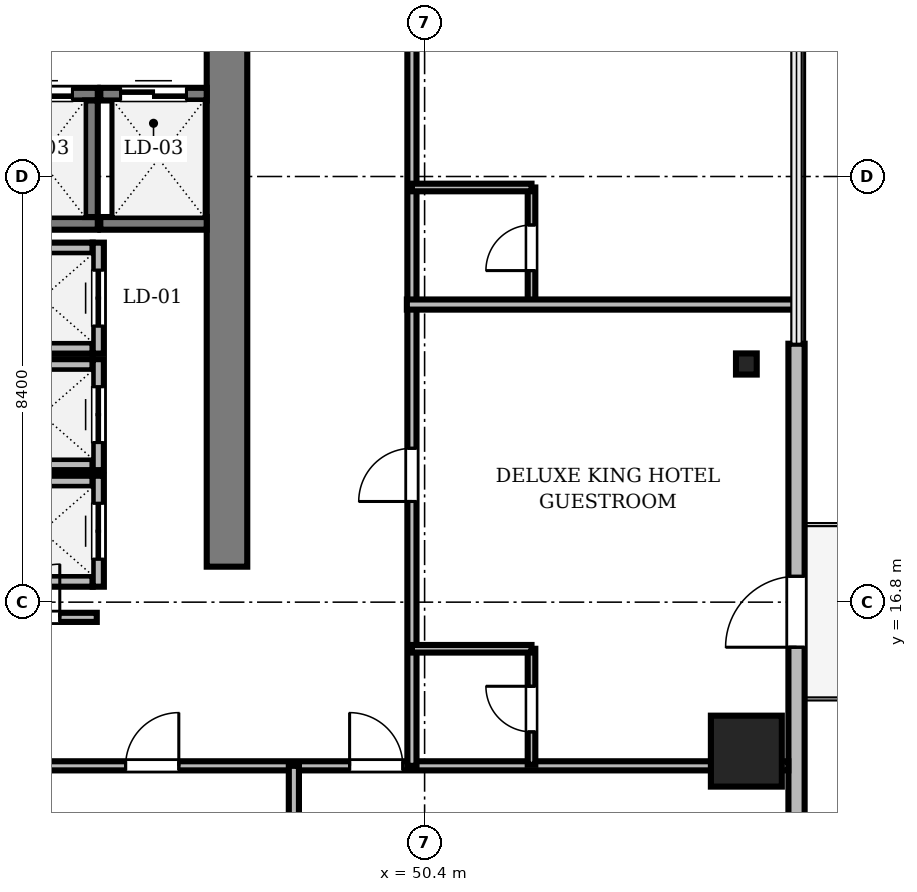
"""IFC4 building model, lengths in metres.
Left out: names, types, materials, properties, quantities, classifications, styles, units other than length and angle.
Written with IfcOpenShell. Run it as: python <this file> out.ifc"""

import sys

from ifc_helpers import new_model, si_unit, direction, frame, frame_2d, origin, origin_2d, place, context, subcontext, project, spatial, rectangle, i_section, extrude, source, transform, mapped, element, fill, save


model = new_model("IFC4")
c1 = context("Model", 3, precision=1e-05, world=origin(), true_north=direction((0.0, 1.0)))
c2 = subcontext(c1, "Body", "Model", "MODEL_VIEW")
j1 = project(units=[si_unit("LENGTHUNIT", "METRE"), si_unit("PLANEANGLEUNIT", "RADIAN")], contexts=[c1])
p1 = place(None, origin())
s1 = spatial("IfcSite", under=j1, at=p1, CompositionType="ELEMENT")
p2 = place(p1, origin())
s2 = spatial("IfcBuilding", under=s1, at=p2, CompositionType="ELEMENT")
p3 = place(p2, frame((0.0, 0.0, 218.55)))
s3 = spatial("IfcBuildingStorey", under=s2, at=p3, CompositionType="ELEMENT", Elevation=218.55)
m1 = source(origin(), c2, "Body", "SweptSolid", [
    extrude(rectangle(XDim=13.15, YDim=0.8, at=frame_2d((6.575, 0.0))), origin(), (0.0, 0.0, 1.0), 3.53),
])
p4 = place(p3, frame((46.5, 17.5, 0.0), z_axis=(0.0, 0.0, 1.0), x_axis=(0.0, 1.0, 0.0)))
e1 = element("IfcWall", 1, at=p4, inside=s3, PredefinedType="SHEAR", context=c2, shape_type="MappedRepresentation", body=[
    mapped(m1, transform((0.0, 0.0, 0.0), scale=1.0)),
])
m2 = source(origin(), c2, "Body", "SweptSolid", [
    extrude(rectangle(XDim=1.4, YDim=1.4, at=origin_2d()), origin(), (0.0, 0.0, 1.0), 3.53),
])
p5 = place(p3, frame((56.75, 13.86, 0.0), z_axis=(0.0, 0.0, 1.0), x_axis=(1.0, 0.0, 0.0)))
e2 = element("IfcColumn", 2, at=p5, inside=s3, PredefinedType="COLUMN", context=c2, shape_type="MappedRepresentation", body=[
    mapped(m2, transform((0.0, 0.0, 0.0), scale=1.0)),
])
m3 = source(origin(), c2, "Body", "SweptSolid", [
    extrude(i_section(OverallWidth=0.409, OverallDepth=0.417, WebThickness=0.021, FlangeThickness=0.033, FilletRadius=0.015, at=origin_2d()), origin(), (0.0, 0.0, 1.0), 3.53),
])
p6 = place(p3, frame((56.75, 21.5, 0.0), z_axis=(0.0, 0.0, 1.0), x_axis=(1.0, 0.0, 0.0)))
e3 = element("IfcColumn", 3, at=p6, inside=s3, PredefinedType="COLUMN", context=c2, shape_type="MappedRepresentation", body=[
    mapped(m3, transform((0.0, 0.0, 0.0), scale=1.0)),
])
m4 = source(origin(), c2, "Body", "SweptSolid", [
    extrude(rectangle(XDim=15.6, YDim=0.32, at=frame_2d((7.8, 0.0))), origin(), (0.0, 0.0, 1.0), 3.53),
])
p7 = place(p3, frame((57.74, 6.3, 0.0), z_axis=(0.0, 0.0, 1.0), x_axis=(0.0, 1.0, 0.0)))
e4 = element("IfcWall", 4, at=p7, inside=s3, PredefinedType="SOLIDWALL", context=c2, shape_type="MappedRepresentation", body=[
    mapped(m4, transform((0.0, 0.0, 0.0), scale=1.0)),
])
m5 = source(origin(), c2, "Body", "SweptSolid", [
    extrude(rectangle(XDim=1.4, YDim=2.3, at=frame_2d((0.7, 1.15))), frame((0.0, 0.17, 0.0), z_axis=(0.0, -1.0, 0.0), x_axis=(1.0, 0.0, 0.0)), (0.0, 0.0, 1.0), 0.34),
])
p8 = place(p7, frame((9.61, 0.0, 0.0)))
e5 = element("IfcOpeningElement", 5, at=p8, cuts=e4, PredefinedType="OPENING", context=c2, shape_type="MappedRepresentation", body=[
    mapped(m5, transform((0.0, 0.0, 0.0), scale=1.0)),
])
m6 = source(origin(), c2, "Body", "SweptSolid", [
    extrude(rectangle(XDim=2.8, YDim=2.4, at=frame_2d((1.4, 1.2))), frame((0.0, 0.17, 0.0), z_axis=(0.0, -1.0, 0.0), x_axis=(1.0, 0.0, 0.0)), (0.0, 0.0, 1.0), 0.34),
])
p9 = place(p7, frame((2.705, 0.0, 0.72)))
e6 = element("IfcOpeningElement", 6, at=p9, cuts=e4, PredefinedType="OPENING", context=c2, shape_type="MappedRepresentation", body=[
    mapped(m6, transform((0.0, 0.0, 0.0), scale=1.0)),
])
m7 = source(origin(), c2, "Body", "SweptSolid", [
    extrude(rectangle(XDim=2.0, YDim=0.22, at=frame_2d((1.0, 0.0))), origin(), (0.0, 0.0, 1.0), 3.53),
])
for number, where, z_axis, x_axis in (
    (7, (41.85, 21.815, 0.0), (0.0, 0.0, 1.0), (1.0, 0.0, 0.0)),
    (8, (41.85, 23.785, 0.0), (0.0, 0.0, 1.0), (1.0, 0.0, 0.0)),
):
    element("IfcWall", number, at=place(p3, frame(where, z_axis=z_axis, x_axis=x_axis)), inside=s3, PredefinedType="SOLIDWALL", context=c2, shape_type="MappedRepresentation", body=[
        mapped(m7, transform((0.0, 0.0, 0.0), scale=1.0)),
    ])
m8 = source(origin(), c2, "Body", "SweptSolid", [
    extrude(rectangle(XDim=2.19, YDim=0.22, at=frame_2d((1.095, 0.0))), origin(), (0.0, 0.0, 1.0), 3.53),
])
p10 = place(p3, frame((43.96, 21.705, 0.0), z_axis=(0.0, 0.0, 1.0), x_axis=(0.0, 1.0, 0.0)))
e9 = element("IfcWall", 9, at=p10, inside=s3, PredefinedType="SOLIDWALL", context=c2, shape_type="MappedRepresentation", body=[
    mapped(m8, transform((0.0, 0.0, 0.0), scale=1.0)),
])
m9 = source(origin(), c2, "Body", "SweptSolid", [
    extrude(rectangle(XDim=1.1, YDim=2.2, at=frame_2d((0.55, 1.1))), frame((0.0, 0.12, 0.0), z_axis=(0.0, -1.0, 0.0), x_axis=(1.0, 0.0, 0.0)), (0.0, 0.0, 1.0), 0.24),
])
p11 = place(p10, frame((0.545, 0.0, 0.0)))
e10 = element("IfcOpeningElement", 10, at=p11, cuts=e9, PredefinedType="OPENING", context=c2, shape_type="MappedRepresentation", body=[
    mapped(m9, transform((0.0, 0.0, 0.0), scale=1.0)),
])
for number, where, z_axis, x_axis in (
    (11, (41.85, 19.515, 0.0), (0.0, 0.0, 1.0), (1.0, 0.0, 0.0)),
    (12, (41.85, 21.485, 0.0), (0.0, 0.0, 1.0), (1.0, 0.0, 0.0)),
):
    element("IfcWall", number, at=place(p3, frame(where, z_axis=z_axis, x_axis=x_axis)), inside=s3, PredefinedType="SOLIDWALL", context=c2, shape_type="MappedRepresentation", body=[
        mapped(m7, transform((0.0, 0.0, 0.0), scale=1.0)),
    ])
p12 = place(p3, frame((43.96, 19.405, 0.0), z_axis=(0.0, 0.0, 1.0), x_axis=(0.0, 1.0, 0.0)))
e13 = element("IfcWall", 13, at=p12, inside=s3, PredefinedType="SOLIDWALL", context=c2, shape_type="MappedRepresentation", body=[
    mapped(m8, transform((0.0, 0.0, 0.0), scale=1.0)),
])
p13 = place(p12, frame((0.545, 0.0, 0.0)))
e14 = element("IfcOpeningElement", 14, at=p13, cuts=e13, PredefinedType="OPENING", context=c2, shape_type="MappedRepresentation", body=[
    mapped(m9, transform((0.0, 0.0, 0.0), scale=1.0)),
])
for number, where, z_axis, x_axis in (
    (15, (41.85, 17.215, 0.0), (0.0, 0.0, 1.0), (1.0, 0.0, 0.0)),
    (16, (41.85, 19.185, 0.0), (0.0, 0.0, 1.0), (1.0, 0.0, 0.0)),
):
    element("IfcWall", number, at=place(p3, frame(where, z_axis=z_axis, x_axis=x_axis)), inside=s3, PredefinedType="SOLIDWALL", context=c2, shape_type="MappedRepresentation", body=[
        mapped(m7, transform((0.0, 0.0, 0.0), scale=1.0)),
    ])
p14 = place(p3, frame((43.96, 17.105, 0.0), z_axis=(0.0, 0.0, 1.0), x_axis=(0.0, 1.0, 0.0)))
e17 = element("IfcWall", 17, at=p14, inside=s3, PredefinedType="SOLIDWALL", context=c2, shape_type="MappedRepresentation", body=[
    mapped(m8, transform((0.0, 0.0, 0.0), scale=1.0)),
])
p15 = place(p14, frame((0.545, 0.0, 0.0)))
e18 = element("IfcOpeningElement", 18, at=p15, cuts=e17, PredefinedType="OPENING", context=c2, shape_type="MappedRepresentation", body=[
    mapped(m9, transform((0.0, 0.0, 0.0), scale=1.0)),
])
m10 = source(origin(), c2, "Body", "SweptSolid", [
    extrude(rectangle(XDim=2.3, YDim=0.25, at=frame_2d((1.15, 0.0))), origin(), (0.0, 0.0, 1.0), 3.53),
])
p16 = place(p3, frame((41.65, 24.275, 0.0), z_axis=(0.0, 0.0, 1.0), x_axis=(1.0, 0.0, 0.0)))
e19 = element("IfcWall", 19, at=p16, inside=s3, PredefinedType="SOLIDWALL", context=c2, shape_type="MappedRepresentation", body=[
    mapped(m10, transform((0.0, 0.0, 0.0), scale=1.0)),
])
p17 = place(p3, frame((41.65, 26.825, 0.0), z_axis=(0.0, 0.0, 1.0), x_axis=(1.0, 0.0, 0.0)))
e20 = element("IfcWall", 20, at=p17, inside=s3, PredefinedType="SOLIDWALL", context=c2, shape_type="MappedRepresentation", body=[
    mapped(m10, transform((0.0, 0.0, 0.0), scale=1.0)),
])
m11 = source(origin(), c2, "Body", "SweptSolid", [
    extrude(rectangle(XDim=1.3, YDim=2.3, at=frame_2d((0.65, 1.15))), frame((0.0, 0.135, 0.0), z_axis=(0.0, -1.0, 0.0), x_axis=(1.0, 0.0, 0.0)), (0.0, 0.0, 1.0), 0.27),
])
p18 = place(p17, frame((0.5, 0.0, 0.0)))
e21 = element("IfcOpeningElement", 21, at=p18, cuts=e20, PredefinedType="OPENING", context=c2, shape_type="MappedRepresentation", body=[
    mapped(m11, transform((0.0, 0.0, 0.0), scale=1.0)),
])
p19 = place(p3, frame((43.825, 24.4, 0.0), z_axis=(0.0, 0.0, 1.0), x_axis=(0.0, 1.0, 0.0)))
e22 = element("IfcWall", 22, at=p19, inside=s3, PredefinedType="SOLIDWALL", context=c2, shape_type="MappedRepresentation", body=[
    mapped(m10, transform((0.0, 0.0, 0.0), scale=1.0)),
])
m12 = source(origin(), c2, "Body", "SweptSolid", [
    extrude(rectangle(XDim=2.1, YDim=0.25, at=frame_2d((1.05, 0.0))), origin(), (0.0, 0.0, 1.0), 3.53),
])
p20 = place(p3, frame((44.0, 24.275, 0.0), z_axis=(0.0, 0.0, 1.0), x_axis=(1.0, 0.0, 0.0)))
e23 = element("IfcWall", 23, at=p20, inside=s3, PredefinedType="SOLIDWALL", context=c2, shape_type="MappedRepresentation", body=[
    mapped(m12, transform((0.0, 0.0, 0.0), scale=1.0)),
])
p21 = place(p3, frame((44.0, 26.825, 0.0), z_axis=(0.0, 0.0, 1.0), x_axis=(1.0, 0.0, 0.0)))
e24 = element("IfcWall", 24, at=p21, inside=s3, PredefinedType="SOLIDWALL", context=c2, shape_type="MappedRepresentation", body=[
    mapped(m12, transform((0.0, 0.0, 0.0), scale=1.0)),
])
p22 = place(p21, frame((0.4, 0.0, 0.0)))
e25 = element("IfcOpeningElement", 25, at=p22, cuts=e24, PredefinedType="OPENING", context=c2, shape_type="MappedRepresentation", body=[
    mapped(m11, transform((0.0, 0.0, 0.0), scale=1.0)),
])
m13 = source(origin(), c2, "Body", "SweptSolid", [
    extrude(rectangle(XDim=46.156, YDim=0.18, at=frame_2d((23.078, 0.0))), origin(), (0.0, 0.0, 1.0), 2.772),
])
p23 = place(p3, frame((11.422, 13.57, 0.0), z_axis=(0.0, 0.0, 1.0), x_axis=(1.0, 0.0, 0.0)))
e26 = element("IfcWall", 26, at=p23, inside=s3, PredefinedType="PARTITIONING", context=c2, shape_type="MappedRepresentation", body=[
    mapped(m13, transform((0.0, 0.0, 0.0), scale=1.0)),
])
m14 = source(origin(), c2, "Body", "SweptSolid", [
    extrude(rectangle(XDim=1.05, YDim=2.2, at=frame_2d((0.525, 1.1))), frame((0.0, 0.1, 0.0), z_axis=(0.0, -1.0, 0.0), x_axis=(1.0, 0.0, 0.0)), (0.0, 0.0, 1.0), 0.2),
])
p24 = place(p23, frame((10.438, 0.0, 0.0)))
e27 = element("IfcOpeningElement", 27, at=p24, cuts=e26, PredefinedType="OPENING", context=c2, shape_type="MappedRepresentation", body=[
    mapped(m14, transform((0.0, 0.0, 0.0), scale=1.0)),
])
p25 = place(p23, frame((13.218, 0.0, 0.0)))
e28 = element("IfcOpeningElement", 28, at=p25, cuts=e26, PredefinedType="OPENING", context=c2, shape_type="MappedRepresentation", body=[
    mapped(m14, transform((0.0, 0.0, 0.0), scale=1.0)),
])
p26 = place(p23, frame((16.893, 0.0, 0.0)))
e29 = element("IfcOpeningElement", 29, at=p26, cuts=e26, PredefinedType="OPENING", context=c2, shape_type="MappedRepresentation", body=[
    mapped(m14, transform((0.0, 0.0, 0.0), scale=1.0)),
])
p27 = place(p23, frame((20.346, 0.0, 0.0)))
e30 = element("IfcOpeningElement", 30, at=p27, cuts=e26, PredefinedType="OPENING", context=c2, shape_type="MappedRepresentation", body=[
    mapped(m14, transform((0.0, 0.0, 0.0), scale=1.0)),
])
p28 = place(p23, frame((24.124, 0.0, 0.0)))
e31 = element("IfcOpeningElement", 31, at=p28, cuts=e26, PredefinedType="OPENING", context=c2, shape_type="MappedRepresentation", body=[
    mapped(m14, transform((0.0, 0.0, 0.0), scale=1.0)),
])
p29 = place(p23, frame((28.226, 0.0, 0.0)))
e32 = element("IfcOpeningElement", 32, at=p29, cuts=e26, PredefinedType="OPENING", context=c2, shape_type="MappedRepresentation", body=[
    mapped(m14, transform((0.0, 0.0, 0.0), scale=1.0)),
])
p30 = place(p23, frame((33.077, 0.0, 0.0)))
e33 = element("IfcOpeningElement", 33, at=p30, cuts=e26, PredefinedType="OPENING", context=c2, shape_type="MappedRepresentation", body=[
    mapped(m14, transform((0.0, 0.0, 0.0), scale=1.0)),
])
p31 = place(p23, frame((37.498, 0.0, 0.0)))
e34 = element("IfcOpeningElement", 34, at=p31, cuts=e26, PredefinedType="OPENING", context=c2, shape_type="MappedRepresentation", body=[
    mapped(m14, transform((0.0, 0.0, 0.0), scale=1.0)),
])
m15 = source(origin(), c2, "Body", "SweptSolid", [
    extrude(rectangle(XDim=27.53, YDim=0.18, at=frame_2d((13.765, 0.0))), origin(), (0.0, 0.0, 1.0), 2.972),
])
p32 = place(p3, frame((50.15, 13.57, 0.0), z_axis=(0.0, 0.0, 1.0), x_axis=(0.0, 1.0, 0.0)))
e35 = element("IfcWall", 35, at=p32, inside=s3, PredefinedType="PARTITIONING", context=c2, shape_type="MappedRepresentation", body=[
    mapped(m15, transform((0.0, 0.0, 0.0), scale=1.0)),
])
p33 = place(p32, frame((5.217, 0.0, 0.0)))
e36 = element("IfcOpeningElement", 36, at=p33, cuts=e35, PredefinedType="OPENING", context=c2, shape_type="MappedRepresentation", body=[
    mapped(m14, transform((0.0, 0.0, 0.0), scale=1.0)),
])
p34 = place(p32, frame((14.32, 0.0, 0.0)))
e37 = element("IfcOpeningElement", 37, at=p34, cuts=e35, PredefinedType="OPENING", context=c2, shape_type="MappedRepresentation", body=[
    mapped(m14, transform((0.0, 0.0, 0.0), scale=1.0)),
])
p35 = place(p32, frame((23.423, 0.0, 0.0)))
e38 = element("IfcOpeningElement", 38, at=p35, cuts=e35, PredefinedType="OPENING", context=c2, shape_type="MappedRepresentation", body=[
    mapped(m14, transform((0.0, 0.0, 0.0), scale=1.0)),
])
m16 = source(origin(), c2, "Body", "SweptSolid", [
    extrude(rectangle(XDim=2.33, YDim=0.18, at=frame_2d((1.165, 0.0))), origin(), (0.0, 0.0, 1.0), 2.972),
])
p36 = place(p3, frame((41.6, 16.5, 0.0), z_axis=(0.0, 0.0, 1.0), x_axis=(1.0, 0.0, 0.0)))
e39 = element("IfcWall", 39, at=p36, inside=s3, PredefinedType="PARTITIONING", context=c2, shape_type="MappedRepresentation", body=[
    mapped(m16, transform((0.0, 0.0, 0.0), scale=1.0)),
])
p37 = place(p36, frame((0.55, 0.0, 0.0)))
e40 = element("IfcOpeningElement", 40, at=p37, cuts=e39, PredefinedType="OPENING", context=c2, shape_type="MappedRepresentation", body=[
    mapped(m14, transform((0.0, 0.0, 0.0), scale=1.0)),
])
m17 = source(origin(), c2, "Body", "SweptSolid", [
    extrude(rectangle(XDim=2.29, YDim=0.15, at=frame_2d((1.145, 0.0))), origin(), (0.0, 0.0, 1.0), 2.972),
])
p38 = place(p3, frame((52.51, 13.59, 0.0), z_axis=(0.0, 0.0, 1.0), x_axis=(0.0, 1.0, 0.0)))
e41 = element("IfcWall", 41, at=p38, inside=s3, PredefinedType="PARTITIONING", context=c2, shape_type="MappedRepresentation", body=[
    mapped(m17, transform((0.0, 0.0, 0.0), scale=1.0)),
])
m18 = source(origin(), c2, "Body", "SweptSolid", [
    extrude(rectangle(XDim=0.9, YDim=2.1, at=frame_2d((0.45, 1.05))), frame((0.0, 0.085, 0.0), z_axis=(0.0, -1.0, 0.0), x_axis=(1.0, 0.0, 0.0)), (0.0, 0.0, 1.0), 0.17),
])
p39 = place(p38, frame((0.65, 0.0, 0.0)))
e42 = element("IfcOpeningElement", 42, at=p39, cuts=e41, PredefinedType="OPENING", context=c2, shape_type="MappedRepresentation", body=[
    mapped(m18, transform((0.0, 0.0, 0.0), scale=1.0)),
])
m19 = source(origin(), c2, "Body", "SweptSolid", [
    extrude(rectangle(XDim=2.29, YDim=0.15, at=frame_2d((1.145, 0.0))), origin(), (0.0, 0.0, 1.0), 3.222),
])
p40 = place(p3, frame((52.51, 22.693, 0.0), z_axis=(0.0, 0.0, 1.0), x_axis=(0.0, 1.0, 0.0)))
e43 = element("IfcWall", 43, at=p40, inside=s3, PredefinedType="PARTITIONING", context=c2, shape_type="MappedRepresentation", body=[
    mapped(m19, transform((0.0, 0.0, 0.0), scale=1.0)),
])
p41 = place(p40, frame((0.65, 0.0, 0.0)))
e44 = element("IfcOpeningElement", 44, at=p41, cuts=e43, PredefinedType="OPENING", context=c2, shape_type="MappedRepresentation", body=[
    mapped(m18, transform((0.0, 0.0, 0.0), scale=1.0)),
])
m20 = source(origin(), c2, "Body", "SweptSolid", [
    extrude(rectangle(XDim=11.448, YDim=0.2, at=frame_2d((5.724, 0.0))), origin(), (0.0, 0.0, 1.0), 2.772),
])
p42 = place(p3, frame((47.82, 2.122, 0.0), z_axis=(0.0, 0.0, 1.0), x_axis=(0.0, 1.0, 0.0)))
e45 = element("IfcWall", 45, at=p42, inside=s3, PredefinedType="PARTITIONING", context=c2, shape_type="MappedRepresentation", body=[
    mapped(m20, transform((0.0, 0.0, 0.0), scale=1.0)),
])
m21 = source(origin(), c2, "Body", "SweptSolid", [
    extrude(rectangle(XDim=7.72, YDim=0.2, at=frame_2d((3.86, 0.0))), origin(), (0.0, 0.0, 1.0), 2.772),
])
p43 = place(p3, frame((50.05, 22.673, 0.0), z_axis=(0.0, 0.0, 1.0), x_axis=(1.0, 0.0, 0.0)))
e46 = element("IfcWall", 46, at=p43, inside=s3, PredefinedType="PARTITIONING", context=c2, shape_type="MappedRepresentation", body=[
    mapped(m21, transform((0.0, 0.0, 0.0), scale=1.0)),
])
m22 = source(origin(), c2, "Body", "SweptSolid", [
    extrude(rectangle(XDim=2.36, YDim=0.15, at=frame_2d((1.18, 0.0))), origin(), (0.0, 0.0, 1.0), 3.53),
])
for number, where, z_axis, x_axis in (
    (47, (50.15, 15.88, 0.0), (0.0, 0.0, 1.0), (1.0, 0.0, 0.0)),
    (48, (50.15, 24.983, 0.0), (0.0, 0.0, 1.0), (1.0, 0.0, 0.0)),
):
    element("IfcWall", number, at=place(p3, frame(where, z_axis=z_axis, x_axis=x_axis)), inside=s3, PredefinedType="PARTITIONING", context=c2, shape_type="MappedRepresentation", body=[
        mapped(m22, transform((0.0, 0.0, 0.0), scale=1.0)),
    ])
m23 = source(origin(), c2, "Body", "SweptSolid", [
    extrude(rectangle(XDim=1.858, YDim=0.18, at=frame_2d((0.929, 0.0))), origin(), (0.0, 0.0, 1.0), 3.53),
])
p44 = place(p3, frame((41.852, 18.45, 0.0), z_axis=(0.0, 0.0, 1.0), x_axis=(1.0, 0.0, 0.0)))
e49 = element("IfcWall", 49, at=p44, inside=s3, PredefinedType="PARTITIONING", context=c2, shape_type="MappedRepresentation", body=[
    mapped(m23, transform((0.0, 0.0, 0.0), scale=1.0)),
])
m24 = source(origin(), c2, "Body", "SweptSolid", [
    extrude(rectangle(XDim=1.4, YDim=2.3, at=frame_2d((0.7, 1.15))), frame((0.0, 0.025, 0.0), z_axis=(0.0, -1.0, 0.0), x_axis=(1.0, 0.0, 0.0)), (0.0, 0.0, 1.0), 0.05),
])
p45 = place(p8, frame((1.4, 0.0, 0.0), z_axis=(0.0, 0.0, 1.0), x_axis=(-1.0, 0.0, 0.0)))
e50 = element("IfcDoor", 50, at=p45, inside=s3, OperationType="DOUBLE_DOOR_SLIDING", PredefinedType="DOOR", context=c2, shape_type="MappedRepresentation", body=[
    mapped(m24, transform((0.0, 0.0, 0.0), scale=1.0)),
])
fill(e5, e50)
m25 = source(origin(), c2, "Body", "SweptSolid", [
    extrude(rectangle(XDim=1.1, YDim=2.2, at=frame_2d((0.55, 1.1))), frame((0.0, 0.025, 0.0), z_axis=(0.0, -1.0, 0.0), x_axis=(1.0, 0.0, 0.0)), (0.0, 0.0, 1.0), 0.05),
])
p46 = place(p11, origin())
e51 = element("IfcDoor", 51, at=p46, inside=s3, OperationType="DOUBLE_DOOR_SLIDING", PredefinedType="DOOR", context=c2, shape_type="MappedRepresentation", body=[
    mapped(m25, transform((0.0, 0.0, 0.0), scale=1.0)),
])
fill(e10, e51)
p47 = place(p13, origin())
e52 = element("IfcDoor", 52, at=p47, inside=s3, OperationType="DOUBLE_DOOR_SLIDING", PredefinedType="DOOR", context=c2, shape_type="MappedRepresentation", body=[
    mapped(m25, transform((0.0, 0.0, 0.0), scale=1.0)),
])
fill(e14, e52)
p48 = place(p15, origin())
e53 = element("IfcDoor", 53, at=p48, inside=s3, OperationType="DOUBLE_DOOR_SLIDING", PredefinedType="DOOR", context=c2, shape_type="MappedRepresentation", body=[
    mapped(m25, transform((0.0, 0.0, 0.0), scale=1.0)),
])
fill(e18, e53)
m26 = source(origin(), c2, "Body", "SweptSolid", [
    extrude(rectangle(XDim=1.3, YDim=2.3, at=frame_2d((0.65, 1.15))), frame((0.0, 0.025, 0.0), z_axis=(0.0, -1.0, 0.0), x_axis=(1.0, 0.0, 0.0)), (0.0, 0.0, 1.0), 0.05),
])
p49 = place(p18, origin())
e54 = element("IfcDoor", 54, at=p49, inside=s3, OperationType="DOUBLE_DOOR_SLIDING", PredefinedType="DOOR", context=c2, shape_type="MappedRepresentation", body=[
    mapped(m26, transform((0.0, 0.0, 0.0), scale=1.0)),
])
fill(e21, e54)
p50 = place(p22, origin())
e55 = element("IfcDoor", 55, at=p50, inside=s3, OperationType="DOUBLE_DOOR_SLIDING", PredefinedType="DOOR", context=c2, shape_type="MappedRepresentation", body=[
    mapped(m26, transform((0.0, 0.0, 0.0), scale=1.0)),
])
fill(e25, e55)
m27 = source(origin(), c2, "Body", "SweptSolid", [
    extrude(rectangle(XDim=1.05, YDim=2.2, at=frame_2d((0.525, 1.1))), frame((0.0, 0.025, 0.0), z_axis=(0.0, -1.0, 0.0), x_axis=(1.0, 0.0, 0.0)), (0.0, 0.0, 1.0), 0.05),
])
p51 = place(p30, origin())
e56 = element("IfcDoor", 56, at=p51, inside=s3, OperationType="SINGLE_SWING_RIGHT", PredefinedType="DOOR", context=c2, shape_type="MappedRepresentation", body=[
    mapped(m27, transform((0.0, 0.0, 0.0), scale=1.0)),
])
fill(e33, e56)
p52 = place(p31, origin())
e57 = element("IfcDoor", 57, at=p52, inside=s3, OperationType="SINGLE_SWING_LEFT", PredefinedType="DOOR", context=c2, shape_type="MappedRepresentation", body=[
    mapped(m27, transform((0.0, 0.0, 0.0), scale=1.0)),
])
fill(e34, e57)
p53 = place(p33, origin())
e58 = element("IfcDoor", 58, at=p53, inside=s3, OperationType="SINGLE_SWING_LEFT", PredefinedType="DOOR", context=c2, shape_type="MappedRepresentation", body=[
    mapped(m27, transform((0.0, 0.0, 0.0), scale=1.0)),
])
fill(e36, e58)
p54 = place(p37, origin())
e59 = element("IfcDoor", 59, at=p54, inside=s3, OperationType="SINGLE_SWING_RIGHT", PredefinedType="DOOR", context=c2, shape_type="MappedRepresentation", body=[
    mapped(m27, transform((0.0, 0.0, 0.0), scale=1.0)),
])
fill(e40, e59)
m28 = source(origin(), c2, "Body", "SweptSolid", [
    extrude(rectangle(XDim=0.9, YDim=2.1, at=frame_2d((0.45, 1.05))), frame((0.0, 0.025, 0.0), z_axis=(0.0, -1.0, 0.0), x_axis=(1.0, 0.0, 0.0)), (0.0, 0.0, 1.0), 0.05),
])
p55 = place(p39, origin())
e60 = element("IfcDoor", 60, at=p55, inside=s3, OperationType="SINGLE_SWING_RIGHT", PredefinedType="DOOR", context=c2, shape_type="MappedRepresentation", body=[
    mapped(m28, transform((0.0, 0.0, 0.0), scale=1.0)),
])
fill(e42, e60)
p56 = place(p41, origin())
e61 = element("IfcDoor", 61, at=p56, inside=s3, OperationType="SINGLE_SWING_LEFT", PredefinedType="DOOR", context=c2, shape_type="MappedRepresentation", body=[
    mapped(m28, transform((0.0, 0.0, 0.0), scale=1.0)),
])
fill(e44, e61)
save(model, sys.argv[1])
